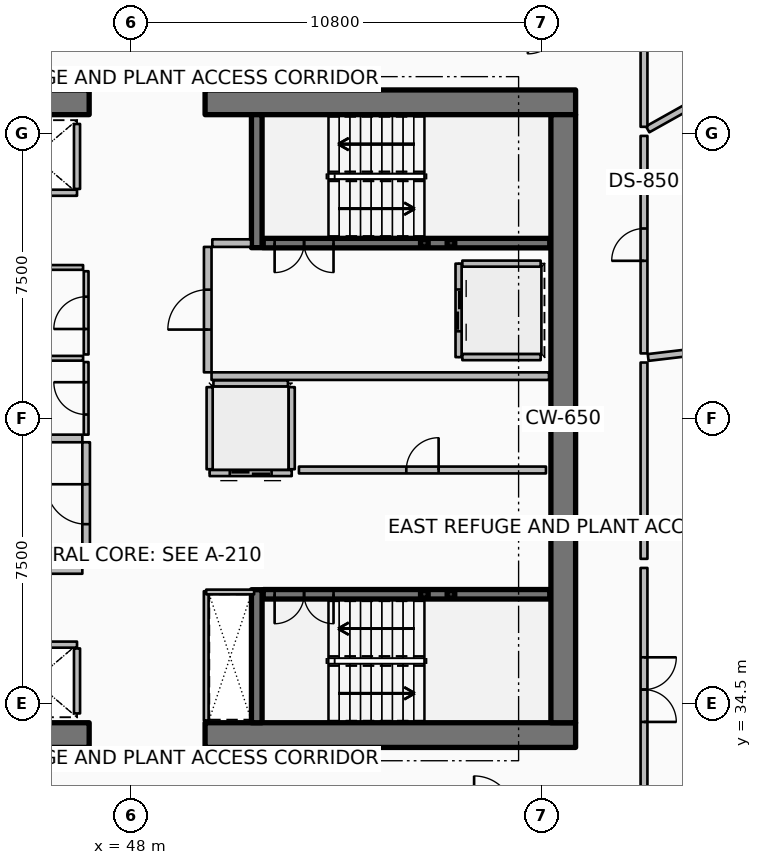
"""IFC4 building model, lengths in metres.
Left out: names, types, materials, properties, quantities, classifications, styles, units other than length and angle.
Written with IfcOpenShell. Run it as: python <this file> out.ifc"""

import sys

from ifc_helpers import new_model, si_unit, direction, frame, frame_2d, origin, origin_2d, place, context, subcontext, project, spatial, rectangle, hollow_rectangle, extrude, element, fill, save


model = new_model("IFC4")
c1 = context("Model", 3, precision=1e-05, world=origin(), true_north=direction((0.0, 1.0)))
c2 = subcontext(c1, "Body", "Model", "MODEL_VIEW")
j1 = project(units=[si_unit("LENGTHUNIT", "METRE"), si_unit("PLANEANGLEUNIT", "RADIAN")], contexts=[c1])
p1 = place(None, origin())
s1 = spatial("IfcSite", under=j1, at=p1, CompositionType="ELEMENT")
p2 = place(p1, origin())
s2 = spatial("IfcBuilding", under=s1, at=p2, CompositionType="ELEMENT")
p3 = place(p2, frame((0.0, 0.0, 225.3)))
s3 = spatial("IfcBuildingStorey", under=s2, at=p3, CompositionType="ELEMENT", Elevation=225.3)
for number, where, z_axis, x_axis in (
    (1, (37.15, 33.675, 0.0), (0.0, 0.0, 1.0), (1.0, 0.0, 0.0)),
    (2, (49.95, 33.675, 0.0), (0.0, 0.0, 1.0), (1.0, 0.0, 0.0)),
    (3, (37.15, 50.325, 0.0), (0.0, 0.0, 1.0), (1.0, 0.0, 0.0)),
    (4, (49.95, 50.325, 0.0), (0.0, 0.0, 1.0), (1.0, 0.0, 0.0)),
):
    element("IfcWall", number, at=place(p3, frame(where, z_axis=z_axis, x_axis=x_axis)), inside=s3, PredefinedType="SHEAR", context=c2, shape_type="SweptSolid", body=[
        extrude(rectangle(XDim=9.75, YDim=0.65, at=frame_2d((4.875, 0.0))), origin(), (0.0, 0.0, 1.0), 6.6),
    ])
p4 = place(p3, frame((59.375, 34.0, 0.0), z_axis=(0.0, 0.0, 1.0), x_axis=(0.0, 1.0, 0.0)))
e5 = element("IfcWall", 5, at=p4, inside=s3, PredefinedType="SHEAR", context=c2, shape_type="SweptSolid", body=[
    extrude(rectangle(XDim=16.0, YDim=0.65, at=frame_2d((8.0, 0.0))), origin(), (0.0, 0.0, 1.0), 6.6),
])
for number, where, z_axis, x_axis in (
    (6, (51.31, 46.5, 0.0), (0.0, 0.0, 1.0), (0.0, 1.0, 0.0)),
    (7, (51.31, 34.0, 0.0), (0.0, 0.0, 1.0), (0.0, 1.0, 0.0)),
):
    element("IfcWall", number, at=place(p3, frame(where, z_axis=z_axis, x_axis=x_axis)), inside=s3, PredefinedType="SHEAR", context=c2, shape_type="SweptSolid", body=[
        extrude(rectangle(XDim=3.5, YDim=0.28, at=frame_2d((1.75, 0.0))), origin(), (0.0, 0.0, 1.0), 6.6),
    ])
p5 = place(p3, frame((55.72, 46.62, 0.0), z_axis=(0.0, 0.0, 1.0), x_axis=(1.0, 0.0, 0.0)))
e8 = element("IfcColumn", 8, at=p5, inside=s3, PredefinedType="COLUMN", context=c2, shape_type="SweptSolid", body=[
    extrude(hollow_rectangle(XDim=0.2, YDim=0.2, WallThickness=0.01, InnerFilletRadius=0.01, OuterFilletRadius=0.02, at=origin_2d()), origin(), (0.0, 0.0, 1.0), 1.445),
])
p6 = place(p3, frame((56.42, 46.62, 0.0), z_axis=(0.0, 0.0, 1.0), x_axis=(1.0, 0.0, 0.0)))
e9 = element("IfcColumn", 9, at=p6, inside=s3, PredefinedType="COLUMN", context=c2, shape_type="SweptSolid", body=[
    extrude(hollow_rectangle(XDim=0.2, YDim=0.2, WallThickness=0.01, InnerFilletRadius=0.01, OuterFilletRadius=0.02, at=origin_2d()), origin(), (0.0, 0.0, 1.0), 4.745),
])
p7 = place(p3, frame((55.72, 37.38, 0.0), z_axis=(0.0, 0.0, 1.0), x_axis=(1.0, 0.0, 0.0)))
e10 = element("IfcColumn", 10, at=p7, inside=s3, PredefinedType="COLUMN", context=c2, shape_type="SweptSolid", body=[
    extrude(hollow_rectangle(XDim=0.2, YDim=0.2, WallThickness=0.01, InnerFilletRadius=0.01, OuterFilletRadius=0.02, at=origin_2d()), origin(), (0.0, 0.0, 1.0), 1.445),
])
p8 = place(p3, frame((56.42, 37.38, 0.0), z_axis=(0.0, 0.0, 1.0), x_axis=(1.0, 0.0, 0.0)))
e11 = element("IfcColumn", 11, at=p8, inside=s3, PredefinedType="COLUMN", context=c2, shape_type="SweptSolid", body=[
    extrude(hollow_rectangle(XDim=0.2, YDim=0.2, WallThickness=0.01, InnerFilletRadius=0.01, OuterFilletRadius=0.02, at=origin_2d()), origin(), (0.0, 0.0, 1.0), 4.745),
])
p9 = place(p3, frame((51.48, 46.62, 0.0), z_axis=(0.0, 0.0, 1.0), x_axis=(1.0, 0.0, 0.0)))
e12 = element("IfcWall", 12, at=p9, inside=s3, PredefinedType="SOLIDWALL", context=c2, shape_type="SweptSolid", body=[
    extrude(rectangle(XDim=7.54, YDim=0.25, at=frame_2d((3.77, 0.0))), origin(), (0.0, 0.0, 1.0), 6.28),
])
p10 = place(p9, frame((0.3, 0.0, 0.0)))
e13 = element("IfcOpeningElement", 13, at=p10, cuts=e12, PredefinedType="OPENING", context=c2, shape_type="SweptSolid", body=[
    extrude(rectangle(XDim=1.55, YDim=2.15, at=frame_2d((0.775, 1.075))), frame((0.0, 0.135, 0.0), z_axis=(0.0, -1.0, 0.0), x_axis=(1.0, 0.0, 0.0)), (0.0, 0.0, 1.0), 0.27),
])
p11 = place(p3, frame((51.48, 37.38, 0.0), z_axis=(0.0, 0.0, 1.0), x_axis=(1.0, 0.0, 0.0)))
e14 = element("IfcWall", 14, at=p11, inside=s3, PredefinedType="SOLIDWALL", context=c2, shape_type="SweptSolid", body=[
    extrude(rectangle(XDim=7.54, YDim=0.25, at=frame_2d((3.77, 0.0))), origin(), (0.0, 0.0, 1.0), 6.28),
])
p12 = place(p11, frame((0.3, 0.0, 0.0)))
e15 = element("IfcOpeningElement", 15, at=p12, cuts=e14, PredefinedType="OPENING", context=c2, shape_type="SweptSolid", body=[
    extrude(rectangle(XDim=1.55, YDim=2.15, at=frame_2d((0.775, 1.075))), frame((0.0, 0.135, 0.0), z_axis=(0.0, -1.0, 0.0), x_axis=(1.0, 0.0, 0.0)), (0.0, 0.0, 1.0), 0.27),
])
p13 = place(p3, frame((46.58, 47.945, 0.0), z_axis=(0.0, 0.0, 1.0), x_axis=(-1.0, 0.0, 0.0)))
e16 = element("IfcWall", 16, at=p13, inside=s3, PredefinedType="PARTITIONING", context=c2, shape_type="SweptSolid", body=[
    extrude(rectangle(XDim=2.26, YDim=0.16, at=frame_2d((1.13, 0.0))), origin(), (0.0, 0.0, 1.0), 6.28),
])
p14 = place(p3, frame((46.58, 48.045, 0.0), z_axis=(0.0, 0.0, 1.0), x_axis=(0.0, 1.0, 0.0)))
e17 = element("IfcWall", 17, at=p14, inside=s3, PredefinedType="PARTITIONING", context=c2, shape_type="SweptSolid", body=[
    extrude(rectangle(XDim=1.71, YDim=0.16, at=frame_2d((0.855, 0.0))), origin(), (0.0, 0.0, 1.0), 6.28),
])
p15 = place(p3, frame((44.32, 36.055, 0.0), z_axis=(0.0, 0.0, 1.0), x_axis=(1.0, 0.0, 0.0)))
e18 = element("IfcWall", 18, at=p15, inside=s3, PredefinedType="PARTITIONING", context=c2, shape_type="SweptSolid", body=[
    extrude(rectangle(XDim=2.26, YDim=0.16, at=frame_2d((1.13, 0.0))), origin(), (0.0, 0.0, 1.0), 6.28),
])
p16 = place(p3, frame((46.58, 34.245, 0.0), z_axis=(0.0, 0.0, 1.0), x_axis=(0.0, 1.0, 0.0)))
e19 = element("IfcWall", 19, at=p16, inside=s3, PredefinedType="PARTITIONING", context=c2, shape_type="SweptSolid", body=[
    extrude(rectangle(XDim=1.71, YDim=0.16, at=frame_2d((0.855, 0.0))), origin(), (0.0, 0.0, 1.0), 6.28),
])
p17 = place(p3, frame((56.62, 46.08, 0.0), z_axis=(0.0, 0.0, 1.0), x_axis=(0.0, -1.0, 0.0)))
e20 = element("IfcWall", 20, at=p17, inside=s3, PredefinedType="PARTITIONING", context=c2, shape_type="SweptSolid", body=[
    extrude(rectangle(XDim=2.46, YDim=0.16, at=frame_2d((1.23, 0.0))), origin(), (0.0, 0.0, 1.0), 6.28),
])
p18 = place(p17, frame((0.68, 0.0, 0.0)))
e21 = element("IfcOpeningElement", 21, at=p18, cuts=e20, PredefinedType="OPENING", context=c2, shape_type="SweptSolid", body=[
    extrude(rectangle(XDim=1.1, YDim=2.1, at=frame_2d((0.55, 1.05))), frame((0.0, 0.09, 0.0), z_axis=(0.0, -1.0, 0.0), x_axis=(1.0, 0.0, 0.0)), (0.0, 0.0, 1.0), 0.18),
])
for number, where, z_axis, x_axis in (
    (22, (56.72, 46.08, 0.0), (0.0, 0.0, 1.0), (1.0, 0.0, 0.0)),
    (23, (56.72, 43.62, 0.0), (0.0, 0.0, 1.0), (1.0, 0.0, 0.0)),
):
    element("IfcWall", number, at=place(p3, frame(where, z_axis=z_axis, x_axis=x_axis)), inside=s3, PredefinedType="PARTITIONING", context=c2, shape_type="SweptSolid", body=[
        extrude(rectangle(XDim=2.06, YDim=0.16, at=frame_2d((1.03, 0.0))), origin(), (0.0, 0.0, 1.0), 6.28),
    ])
p19 = place(p3, frame((52.23, 40.57, 0.0), z_axis=(0.0, 0.0, 1.0), x_axis=(-1.0, 0.0, 0.0)))
e24 = element("IfcWall", 24, at=p19, inside=s3, PredefinedType="PARTITIONING", context=c2, shape_type="SweptSolid", body=[
    extrude(rectangle(XDim=2.16, YDim=0.16, at=frame_2d((1.08, 0.0))), origin(), (0.0, 0.0, 1.0), 6.28),
])
p20 = place(p19, frame((0.53, 0.0, 0.0)))
e25 = element("IfcOpeningElement", 25, at=p20, cuts=e24, PredefinedType="OPENING", context=c2, shape_type="SweptSolid", body=[
    extrude(rectangle(XDim=1.1, YDim=2.1, at=frame_2d((0.55, 1.05))), frame((0.0, 0.09, 0.0), z_axis=(0.0, -1.0, 0.0), x_axis=(1.0, 0.0, 0.0)), (0.0, 0.0, 1.0), 0.18),
])
for number, where, z_axis, x_axis in (
    (26, (52.23, 40.67, 0.0), (0.0, 0.0, 1.0), (0.0, 1.0, 0.0)),
    (27, (50.07, 40.67, 0.0), (0.0, 0.0, 1.0), (0.0, 1.0, 0.0)),
):
    element("IfcWall", number, at=place(p3, frame(where, z_axis=z_axis, x_axis=x_axis)), inside=s3, PredefinedType="PARTITIONING", context=c2, shape_type="SweptSolid", body=[
        extrude(rectangle(XDim=2.16, YDim=0.16, at=frame_2d((1.08, 0.0))), origin(), (0.0, 0.0, 1.0), 6.28),
    ])
p21 = place(p3, frame((50.17, 42.93, 0.0), z_axis=(0.0, 0.0, 1.0), x_axis=(1.0, 0.0, 0.0)))
e28 = element("IfcWall", 28, at=p21, inside=s3, PredefinedType="PARTITIONING", context=c2, shape_type="SweptSolid", body=[
    extrude(rectangle(XDim=1.96, YDim=0.16, at=frame_2d((0.98, 0.0))), origin(), (0.0, 0.0, 1.0), 6.28),
])
p22 = place(p3, frame((52.42, 40.65, 0.0), z_axis=(0.0, 0.0, 1.0), x_axis=(1.0, 0.0, 0.0)))
e29 = element("IfcWall", 29, at=p22, inside=s3, PredefinedType="PARTITIONING", context=c2, shape_type="SweptSolid", body=[
    extrude(rectangle(XDim=6.5, YDim=0.18, at=frame_2d((3.25, 0.0))), origin(), (0.0, 0.0, 1.0), 6.28),
])
p23 = place(p22, frame((2.825, 0.0, 0.0)))
e30 = element("IfcOpeningElement", 30, at=p23, cuts=e29, PredefinedType="OPENING", context=c2, shape_type="SweptSolid", body=[
    extrude(rectangle(XDim=0.85, YDim=2.06, at=frame_2d((0.425, 1.03))), frame((0.0, 0.1, 0.0), z_axis=(0.0, -1.0, 0.0), x_axis=(1.0, 0.0, 0.0)), (0.0, 0.0, 1.0), 0.2),
])
p24 = place(p3, frame((41.35, 38.02, 0.0), z_axis=(0.0, 0.0, 1.0), x_axis=(1.0, 0.0, 0.0)))
e31 = element("IfcWall", 31, at=p24, inside=s3, PredefinedType="PARTITIONING", context=c2, shape_type="SweptSolid", body=[
    extrude(rectangle(XDim=5.37, YDim=0.2, at=frame_2d((2.685, 0.0))), origin(), (0.0, 0.0, 1.0), 6.28),
])
p25 = place(p3, frame((43.92, 41.48, 0.0), z_axis=(0.0, 0.0, 1.0), x_axis=(1.0, 0.0, 0.0)))
e32 = element("IfcWall", 32, at=p25, inside=s3, PredefinedType="PARTITIONING", context=c2, shape_type="SweptSolid", body=[
    extrude(rectangle(XDim=2.8, YDim=0.2, at=frame_2d((1.4, 0.0))), origin(), (0.0, 0.0, 1.0), 6.28),
])
p26 = place(p3, frame((46.82, 38.12, 0.0), z_axis=(0.0, 0.0, 1.0), x_axis=(0.0, 1.0, 0.0)))
e33 = element("IfcWall", 33, at=p26, inside=s3, PredefinedType="PARTITIONING", context=c2, shape_type="SweptSolid", body=[
    extrude(rectangle(XDim=3.26, YDim=0.2, at=frame_2d((1.63, 0.0))), origin(), (0.0, 0.0, 1.0), 6.28),
])
p27 = place(p26, frame((1.105, 0.0, 0.0)))
e34 = element("IfcOpeningElement", 34, at=p27, cuts=e33, PredefinedType="OPENING", context=c2, shape_type="SweptSolid", body=[
    extrude(rectangle(XDim=1.05, YDim=2.1, at=frame_2d((0.525, 1.05))), frame((0.0, 0.11, 0.0), z_axis=(0.0, -1.0, 0.0), x_axis=(1.0, 0.0, 0.0)), (0.0, 0.0, 1.0), 0.22),
])
p28 = place(p3, frame((50.12, 43.12, 0.0), z_axis=(0.0, 0.0, 1.0), x_axis=(1.0, 0.0, 0.0)))
e35 = element("IfcWall", 35, at=p28, inside=s3, PredefinedType="PARTITIONING", context=c2, shape_type="SweptSolid", body=[
    extrude(rectangle(XDim=8.88, YDim=0.2, at=frame_2d((4.44, 0.0))), origin(), (0.0, 0.0, 1.0), 6.28),
])
p29 = place(p3, frame((50.14, 46.62, 0.0), z_axis=(0.0, 0.0, 1.0), x_axis=(1.0, 0.0, 0.0)))
e36 = element("IfcWall", 36, at=p29, inside=s3, PredefinedType="PARTITIONING", context=c2, shape_type="SweptSolid", body=[
    extrude(rectangle(XDim=1.02, YDim=0.2, at=frame_2d((0.51, 0.0))), origin(), (0.0, 0.0, 1.0), 6.28),
])
p30 = place(p3, frame((50.02, 43.22, 0.0), z_axis=(0.0, 0.0, 1.0), x_axis=(0.0, 1.0, 0.0)))
e37 = element("IfcWall", 37, at=p30, inside=s3, PredefinedType="PARTITIONING", context=c2, shape_type="SweptSolid", body=[
    extrude(rectangle(XDim=3.3, YDim=0.2, at=frame_2d((1.65, 0.0))), origin(), (0.0, 0.0, 1.0), 6.28),
])
p31 = place(p30, frame((1.125, 0.0, 0.0)))
e38 = element("IfcOpeningElement", 38, at=p31, cuts=e37, PredefinedType="OPENING", context=c2, shape_type="SweptSolid", body=[
    extrude(rectangle(XDim=1.05, YDim=2.1, at=frame_2d((0.525, 1.05))), frame((0.0, 0.11, 0.0), z_axis=(0.0, -1.0, 0.0), x_axis=(1.0, 0.0, 0.0)), (0.0, 0.0, 1.0), 0.22),
])
p32 = place(p3, frame((49.98, 34.06, 0.0), z_axis=(0.0, 0.0, 1.0), x_axis=(0.0, 1.0, 0.0)))
e39 = element("IfcWall", 39, at=p32, inside=s3, PredefinedType="PARTITIONING", context=c2, shape_type="SweptSolid", body=[
    extrude(rectangle(XDim=3.4, YDim=0.125, at=frame_2d((1.7, 0.0))), origin(), (0.0, 0.0, 1.0), 5.72),
])
p33 = place(p3, frame((49.98, 37.44, 0.0), z_axis=(0.0, 0.0, 1.0), x_axis=(1.0, 0.0, 0.0)))
e40 = element("IfcWall", 40, at=p33, inside=s3, PredefinedType="PARTITIONING", context=c2, shape_type="SweptSolid", body=[
    extrude(rectangle(XDim=1.26, YDim=0.125, at=frame_2d((0.63, 0.0))), origin(), (0.0, 0.0, 1.0), 5.72),
])
p34 = place(p3, frame((44.03, 43.59, 0.0), z_axis=(0.0, 0.0, 1.0), x_axis=(1.0, 0.0, 0.0)))
e41 = element("IfcWall", 41, at=p34, inside=s3, PredefinedType="PARTITIONING", context=c2, shape_type="SweptSolid", body=[
    extrude(rectangle(XDim=2.71, YDim=0.125, at=frame_2d((1.355, 0.0))), origin(), (0.0, 0.0, 1.0), 5.72),
])
p35 = place(p3, frame((46.82, 41.58, 0.0), z_axis=(0.0, 0.0, 1.0), x_axis=(0.0, 1.0, 0.0)))
e42 = element("IfcWall", 42, at=p35, inside=s3, PredefinedType="PARTITIONING", context=c2, shape_type="SweptSolid", body=[
    extrude(rectangle(XDim=1.91, YDim=0.125, at=frame_2d((0.955, 0.0))), origin(), (0.0, 0.0, 1.0), 5.72),
])
p36 = place(p35, frame((0.53, 0.0, 0.0)))
e43 = element("IfcOpeningElement", 43, at=p36, cuts=e42, PredefinedType="OPENING", context=c2, shape_type="SweptSolid", body=[
    extrude(rectangle(XDim=0.85, YDim=2.06, at=frame_2d((0.425, 1.03))), frame((0.0, 0.073, 0.0), z_axis=(0.0, -1.0, 0.0), x_axis=(1.0, 0.0, 0.0)), (0.0, 0.0, 1.0), 0.145),
])
p37 = place(p3, frame((46.82, 43.69, 0.0), z_axis=(0.0, 0.0, 1.0), x_axis=(0.0, 1.0, 0.0)))
e44 = element("IfcWall", 44, at=p37, inside=s3, PredefinedType="PARTITIONING", context=c2, shape_type="SweptSolid", body=[
    extrude(rectangle(XDim=2.19, YDim=0.125, at=frame_2d((1.095, 0.0))), origin(), (0.0, 0.0, 1.0), 5.72),
])
p38 = place(p37, frame((0.67, 0.0, 0.0)))
e45 = element("IfcOpeningElement", 45, at=p38, cuts=e44, PredefinedType="OPENING", context=c2, shape_type="SweptSolid", body=[
    extrude(rectangle(XDim=0.85, YDim=2.06, at=frame_2d((0.425, 1.03))), frame((0.0, 0.073, 0.0), z_axis=(0.0, -1.0, 0.0), x_axis=(1.0, 0.0, 0.0)), (0.0, 0.0, 1.0), 0.145),
])
p39 = place(p3, frame((45.48, 45.98, 0.0), z_axis=(0.0, 0.0, 1.0), x_axis=(1.0, 0.0, 0.0)))
e46 = element("IfcWall", 46, at=p39, inside=s3, PredefinedType="PARTITIONING", context=c2, shape_type="SweptSolid", body=[
    extrude(rectangle(XDim=1.26, YDim=0.125, at=frame_2d((0.63, 0.0))), origin(), (0.0, 0.0, 1.0), 5.72),
])
p40 = place(p3, frame((61.5, 31.67, 0.0), z_axis=(0.0, 0.0, 1.0), x_axis=(0.0, 1.0, 0.0)))
e47 = element("IfcWall", 47, at=p40, inside=s3, PredefinedType="PARTITIONING", context=c2, shape_type="SweptSolid", body=[
    extrude(rectangle(XDim=6.403, YDim=0.18, at=frame_2d((3.201, 0.0))), origin(), (0.0, 0.0, 1.0), 2.304),
])
p41 = place(p40, frame((2.351, 0.0, 0.0)))
e48 = element("IfcOpeningElement", 48, at=p41, cuts=e47, PredefinedType="OPENING", context=c2, shape_type="SweptSolid", body=[
    extrude(rectangle(XDim=1.7, YDim=2.15, at=frame_2d((0.85, 1.075))), frame((0.0, 0.1, 0.0), z_axis=(0.0, -1.0, 0.0), x_axis=(1.0, 0.0, 0.0)), (0.0, 0.0, 1.0), 0.2),
])
p42 = place(p3, frame((61.5, 38.312, 0.0), z_axis=(0.0, 0.0, 1.0), x_axis=(0.0, 1.0, 0.0)))
e49 = element("IfcWall", 49, at=p42, inside=s3, PredefinedType="PARTITIONING", context=c2, shape_type="SweptSolid", body=[
    extrude(rectangle(XDim=5.165, YDim=0.18, at=frame_2d((2.583, 0.0))), origin(), (0.0, 0.0, 1.0), 2.304),
])
p43 = place(p3, frame((61.609, 43.611, 0.0), z_axis=(0.0, 0.0, 1.0), x_axis=(0.993068014992, 0.117541131527, 0.0)))
e50 = element("IfcWall", 50, at=p43, inside=s3, PredefinedType="PARTITIONING", context=c2, shape_type="SweptSolid", body=[
    extrude(rectangle(XDim=11.374, YDim=0.18, at=frame_2d((5.687, 0.0))), origin(), (0.0, 0.0, 1.0), 5.273),
])
p44 = place(p3, frame((61.5, 43.718, 0.0), z_axis=(0.0, 0.0, 1.0), x_axis=(0.0, 1.0, 0.0)))
e51 = element("IfcWall", 51, at=p44, inside=s3, PredefinedType="PARTITIONING", context=c2, shape_type="SweptSolid", body=[
    extrude(rectangle(XDim=5.723, YDim=0.18, at=frame_2d((2.861, 0.0))), origin(), (0.0, 0.0, 1.0), 5.273),
])
p45 = place(p44, frame((2.436, 0.0, 0.0)))
e52 = element("IfcOpeningElement", 52, at=p45, cuts=e51, PredefinedType="OPENING", context=c2, shape_type="SweptSolid", body=[
    extrude(rectangle(XDim=0.85, YDim=2.06, at=frame_2d((0.425, 1.03))), frame((0.0, 0.1, 0.0), z_axis=(0.0, -1.0, 0.0), x_axis=(1.0, 0.0, 0.0)), (0.0, 0.0, 1.0), 0.2),
])
p46 = place(p3, frame((61.596, 49.614, 0.0), z_axis=(0.0, 0.0, 1.0), x_axis=(0.872495493118, 0.488622159227, 0.0)))
e53 = element("IfcWall", 53, at=p46, inside=s3, PredefinedType="PARTITIONING", context=c2, shape_type="SweptSolid", body=[
    extrude(rectangle(XDim=9.495, YDim=0.18, at=frame_2d((4.748, 0.0))), origin(), (0.0, 0.0, 1.0), 5.273),
])
p47 = place(p3, frame((61.5, 49.68, 0.0), z_axis=(0.0, 0.0, 1.0), x_axis=(0.0, 1.0, 0.0)))
e54 = element("IfcWall", 54, at=p47, inside=s3, PredefinedType="PARTITIONING", context=c2, shape_type="SweptSolid", body=[
    extrude(rectangle(XDim=2.65, YDim=0.18, at=frame_2d((1.325, 0.0))), origin(), (0.0, 0.0, 1.0), 5.273),
])
p48 = place(p10, origin())
e55 = element("IfcDoor", 55, at=p48, inside=s3, OperationType="DOUBLE_DOOR_SINGLE_SWING", PredefinedType="DOOR", context=c2, shape_type="SweptSolid", body=[
    extrude(rectangle(XDim=1.55, YDim=2.15, at=frame_2d((0.775, 1.075))), frame((0.0, 0.025, 0.0), z_axis=(0.0, -1.0, 0.0), x_axis=(1.0, 0.0, 0.0)), (0.0, 0.0, 1.0), 0.05),
])
fill(e13, e55)
p49 = place(p12, origin())
e56 = element("IfcDoor", 56, at=p49, inside=s3, OperationType="DOUBLE_DOOR_SINGLE_SWING", PredefinedType="DOOR", context=c2, shape_type="SweptSolid", body=[
    extrude(rectangle(XDim=1.55, YDim=2.15, at=frame_2d((0.775, 1.075))), frame((0.0, 0.025, 0.0), z_axis=(0.0, -1.0, 0.0), x_axis=(1.0, 0.0, 0.0)), (0.0, 0.0, 1.0), 0.05),
])
fill(e15, e56)
p50 = place(p18, origin())
e57 = element("IfcDoor", 57, at=p50, inside=s3, OperationType="DOUBLE_DOOR_SLIDING", PredefinedType="DOOR", context=c2, shape_type="SweptSolid", body=[
    extrude(rectangle(XDim=1.1, YDim=2.1, at=frame_2d((0.55, 1.05))), frame((0.0, 0.025, 0.0), z_axis=(0.0, -1.0, 0.0), x_axis=(1.0, 0.0, 0.0)), (0.0, 0.0, 1.0), 0.05),
])
fill(e21, e57)
p51 = place(p20, origin())
e58 = element("IfcDoor", 58, at=p51, inside=s3, OperationType="DOUBLE_DOOR_SLIDING", PredefinedType="DOOR", context=c2, shape_type="SweptSolid", body=[
    extrude(rectangle(XDim=1.1, YDim=2.1, at=frame_2d((0.55, 1.05))), frame((0.0, 0.025, 0.0), z_axis=(0.0, -1.0, 0.0), x_axis=(1.0, 0.0, 0.0)), (0.0, 0.0, 1.0), 0.05),
])
fill(e25, e58)
p52 = place(p23, origin())
e59 = element("IfcDoor", 59, at=p52, inside=s3, OperationType="SINGLE_SWING_RIGHT", PredefinedType="DOOR", context=c2, shape_type="SweptSolid", body=[
    extrude(rectangle(XDim=0.85, YDim=2.06, at=frame_2d((0.425, 1.03))), frame((0.0, 0.025, 0.0), z_axis=(0.0, -1.0, 0.0), x_axis=(1.0, 0.0, 0.0)), (0.0, 0.0, 1.0), 0.05),
])
fill(e30, e59)
p53 = place(p27, origin())
e60 = element("IfcDoor", 60, at=p53, inside=s3, OperationType="SINGLE_SWING_RIGHT", PredefinedType="DOOR", context=c2, shape_type="SweptSolid", body=[
    extrude(rectangle(XDim=1.05, YDim=2.1, at=frame_2d((0.525, 1.05))), frame((0.0, 0.025, 0.0), z_axis=(0.0, -1.0, 0.0), x_axis=(1.0, 0.0, 0.0)), (0.0, 0.0, 1.0), 0.05),
])
fill(e34, e60)
p54 = place(p31, origin())
e61 = element("IfcDoor", 61, at=p54, inside=s3, OperationType="SINGLE_SWING_LEFT", PredefinedType="DOOR", context=c2, shape_type="SweptSolid", body=[
    extrude(rectangle(XDim=1.05, YDim=2.1, at=frame_2d((0.525, 1.05))), frame((0.0, 0.025, 0.0), z_axis=(0.0, -1.0, 0.0), x_axis=(1.0, 0.0, 0.0)), (0.0, 0.0, 1.0), 0.05),
])
fill(e38, e61)
p55 = place(p36, origin())
e62 = element("IfcDoor", 62, at=p55, inside=s3, OperationType="SINGLE_SWING_RIGHT", PredefinedType="DOOR", context=c2, shape_type="SweptSolid", body=[
    extrude(rectangle(XDim=0.85, YDim=2.06, at=frame_2d((0.425, 1.03))), frame((0.0, 0.025, 0.0), z_axis=(0.0, -1.0, 0.0), x_axis=(1.0, 0.0, 0.0)), (0.0, 0.0, 1.0), 0.05),
])
fill(e43, e62)
p56 = place(p38, origin())
e63 = element("IfcDoor", 63, at=p56, inside=s3, OperationType="SINGLE_SWING_LEFT", PredefinedType="DOOR", context=c2, shape_type="SweptSolid", body=[
    extrude(rectangle(XDim=0.85, YDim=2.06, at=frame_2d((0.425, 1.03))), frame((0.0, 0.025, 0.0), z_axis=(0.0, -1.0, 0.0), x_axis=(1.0, 0.0, 0.0)), (0.0, 0.0, 1.0), 0.05),
])
fill(e45, e63)
p57 = place(p41, origin())
e64 = element("IfcDoor", 64, at=p57, inside=s3, OperationType="DOUBLE_DOOR_SINGLE_SWING", PredefinedType="DOOR", context=c2, shape_type="SweptSolid", body=[
    extrude(rectangle(XDim=1.7, YDim=2.15, at=frame_2d((0.85, 1.075))), frame((0.0, 0.025, 0.0), z_axis=(0.0, -1.0, 0.0), x_axis=(1.0, 0.0, 0.0)), (0.0, 0.0, 1.0), 0.05),
])
fill(e48, e64)
p58 = place(p45, origin())
e65 = element("IfcDoor", 65, at=p58, inside=s3, OperationType="SINGLE_SWING_LEFT", PredefinedType="DOOR", context=c2, shape_type="SweptSolid", body=[
    extrude(rectangle(XDim=0.85, YDim=2.06, at=frame_2d((0.425, 1.03))), frame((0.0, 0.025, 0.0), z_axis=(0.0, -1.0, 0.0), x_axis=(1.0, 0.0, 0.0)), (0.0, 0.0, 1.0), 0.05),
])
fill(e52, e65)
save(model, sys.argv[1])
